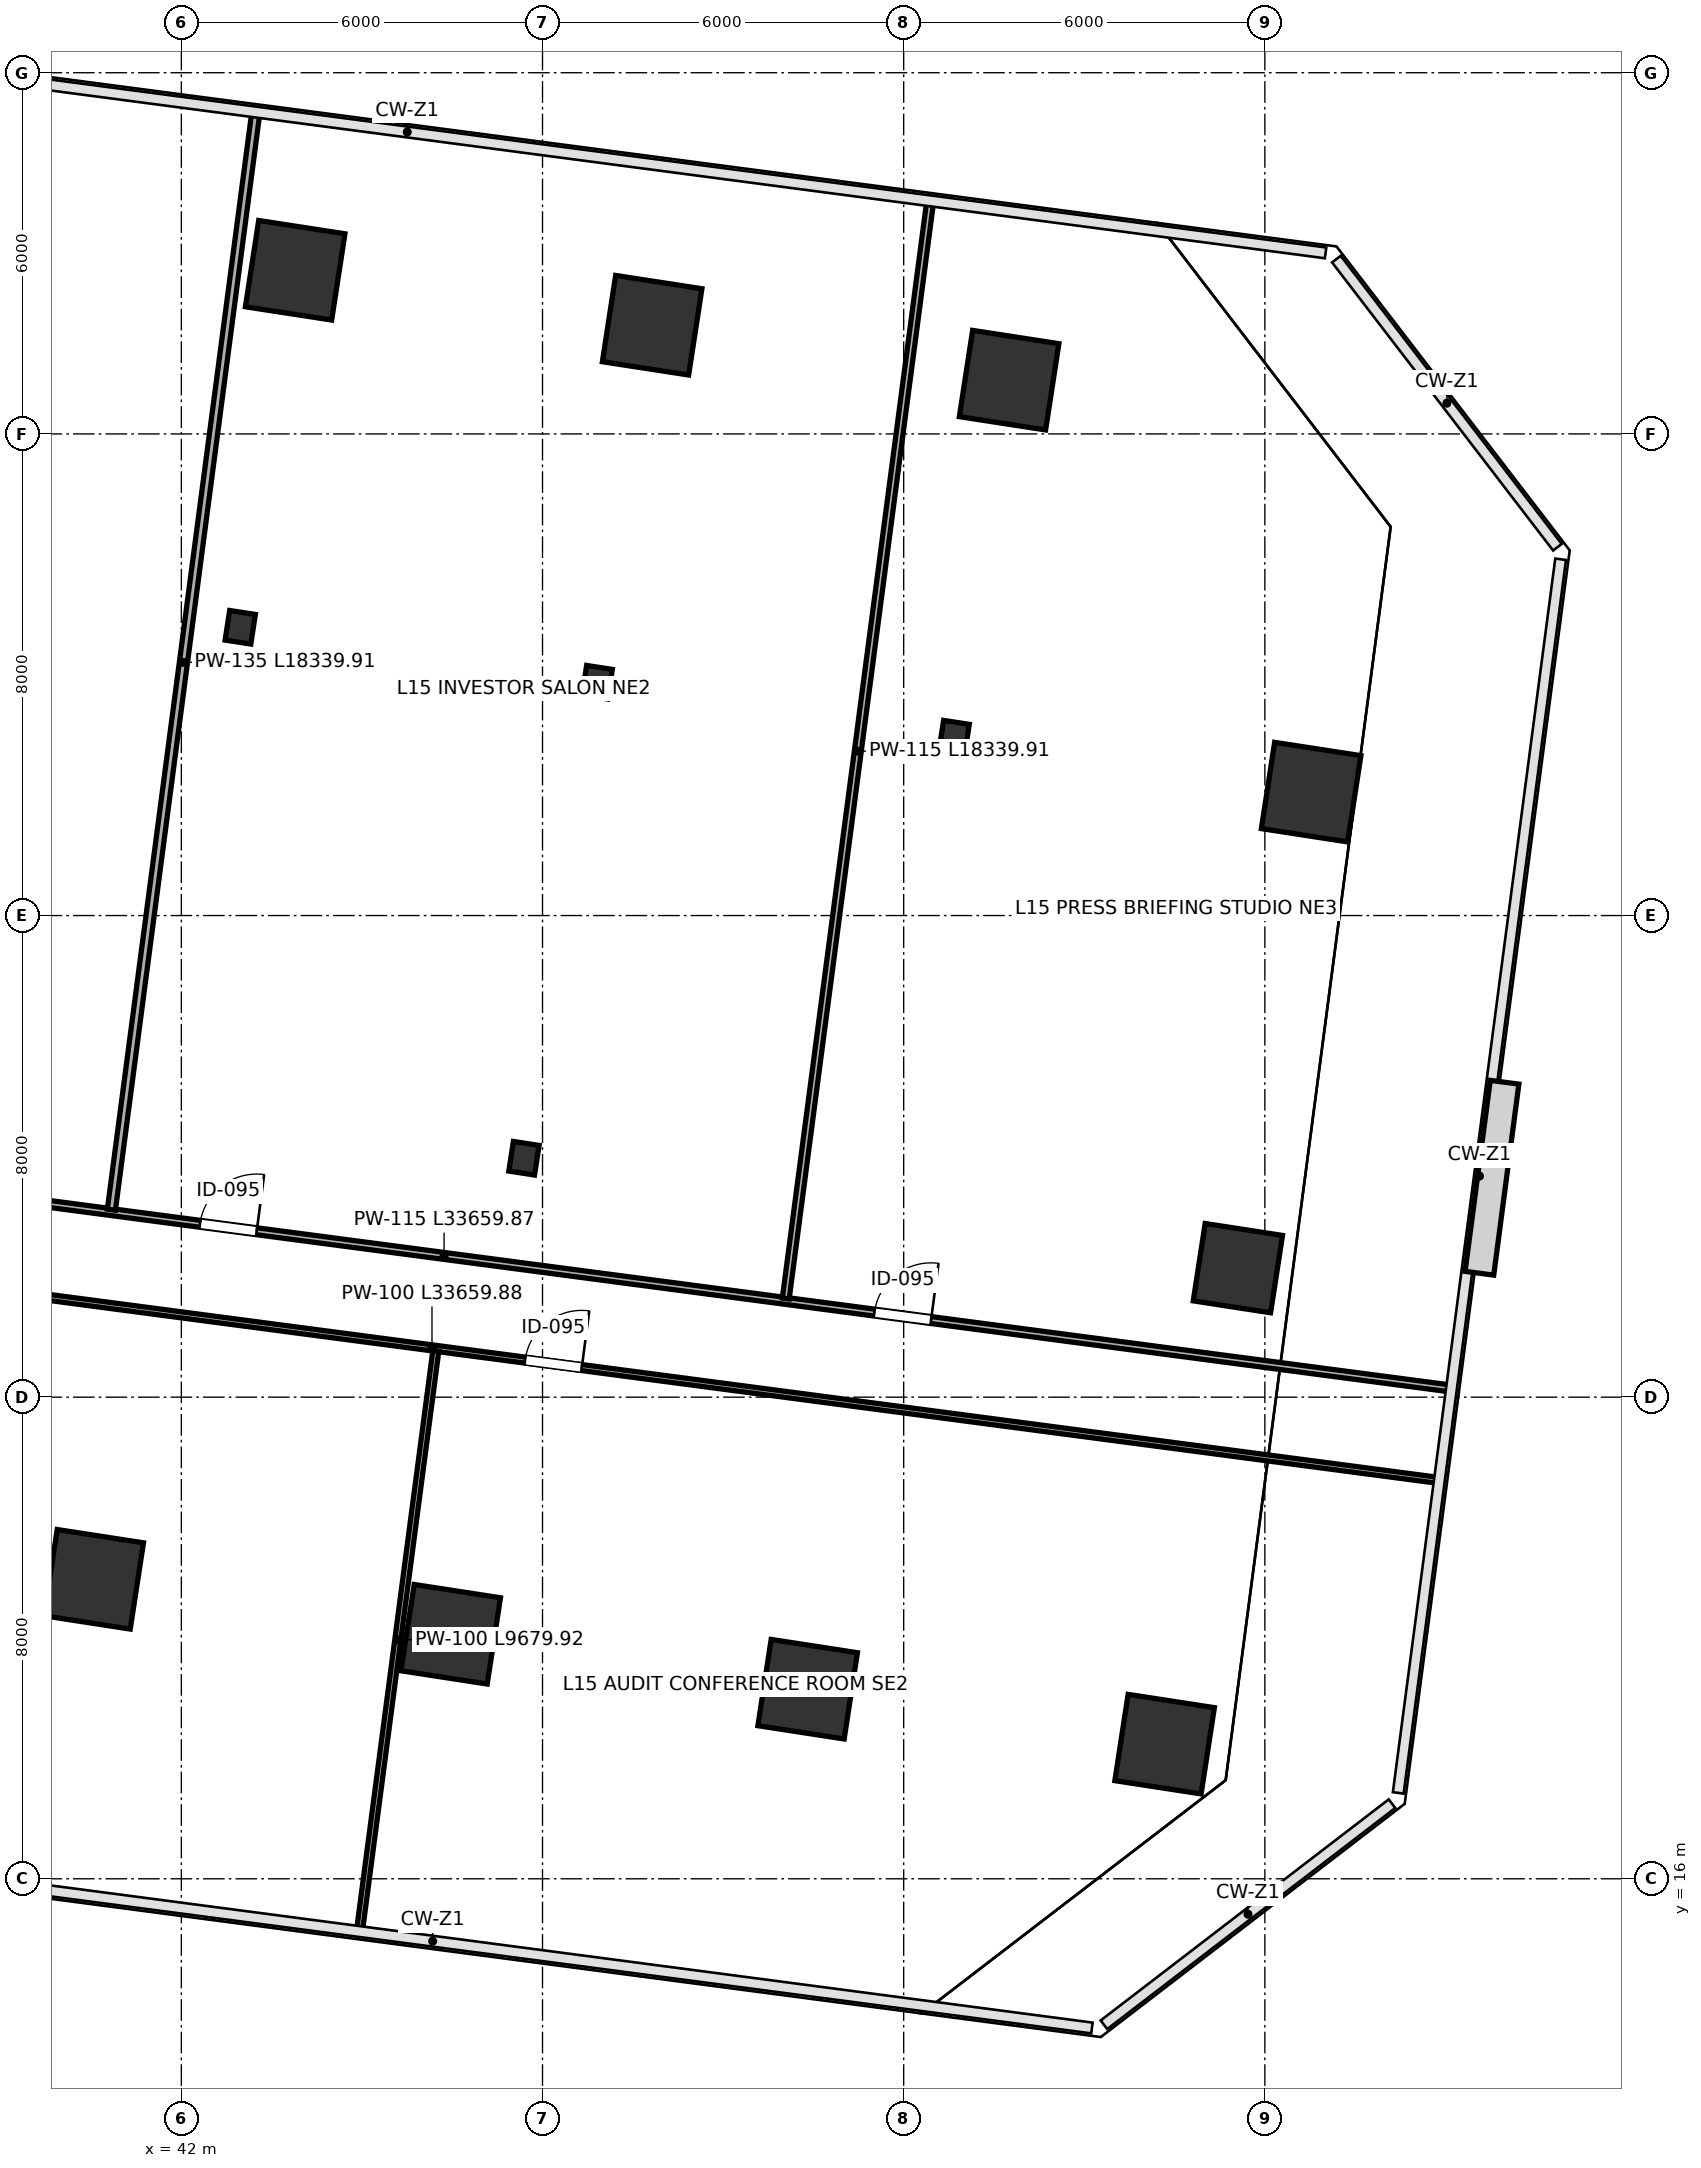
"""IFC4 building model, lengths in metres.
Left out: names, types, materials, properties, quantities, classifications, styles, units other than length and angle.
Written with IfcOpenShell. Run it as: python <this file> out.ifc"""

import sys

from ifc_helpers import new_model, si_unit, direction, frame, frame_2d, origin, origin_2d, place, context, subcontext, project, spatial, rectangle, i_section, extrude, clip, halfspace, source, transform, mapped, element, fill, save


model = new_model("IFC4")
c1 = context("Model", 3, precision=1e-05, world=origin(), true_north=direction((0.0, 1.0)))
c2 = subcontext(c1, "Body", "Model", "MODEL_VIEW")
j1 = project(units=[si_unit("LENGTHUNIT", "METRE"), si_unit("PLANEANGLEUNIT", "RADIAN")], contexts=[c1])
p1 = place(None, origin())
s1 = spatial("IfcSite", under=j1, at=p1, CompositionType="ELEMENT")
p2 = place(p1, origin())
s2 = spatial("IfcBuilding", under=s1, at=p2, CompositionType="ELEMENT")
p3 = place(p2, frame((0.0, 0.0, 70.6)))
s3 = spatial("IfcBuildingStorey", under=s2, at=p3, CompositionType="ELEMENT", Elevation=70.6)
p4 = place(p3, frame((40.544, 20.975, 0.0), z_axis=(-0.057984263369, -0.097660746371, 0.993529166064), x_axis=(-0.772693676035, 0.634543900817, 0.017277758853)))
e1 = element("IfcColumn", 1, at=p4, inside=s3, PredefinedType="COLUMN", context=c2, shape_type="Clipping", body=[
    clip(clip(extrude(rectangle(XDim=1.45, YDim=1.45, at=origin_2d()), origin(), (0.0, 0.0, 1.0), 4.227), halfspace(frame((0.0, 0.0, 0.095), z_axis=(0.0, 0.0, -1.0), x_axis=(1.0, 0.0, 0.0)), False)), halfspace(frame((0.0, 0.0, 4.132), z_axis=(0.0, 0.0, 1.0), x_axis=(1.0, 0.0, 0.0)), False)),
])
p5 = place(p3, frame((42.979, 36.788, 0.0), z_axis=(0.023447854256, -0.111117417708, 0.993530632448), x_axis=(-0.998270833842, -0.05618619741, 0.017275807401)))
e2 = element("IfcColumn", 2, at=p5, inside=s3, PredefinedType="COLUMN", context=c2, shape_type="Clipping", body=[
    clip(clip(extrude(i_section(OverallWidth=0.432, OverallDepth=0.498, WebThickness=0.056, FlangeThickness=0.089, FilletRadius=0.015, at=origin_2d()), origin(), (0.0, 0.0, 1.0), 4.227), halfspace(frame((0.0, 0.0, 0.033), z_axis=(0.0, 0.0, -1.0), x_axis=(1.0, 0.0, 0.0)), False)), halfspace(frame((0.0, 0.0, 4.195), z_axis=(0.0, 0.0, 1.0), x_axis=(1.0, 0.0, 0.0)), False)),
])
p6 = place(p3, frame((43.891, 42.719, 0.0), z_axis=(0.053962386777, -0.115938418599, 0.991789465515), x_axis=(-0.9597220403, -0.280276928816, 0.019453753756)))
e3 = element("IfcColumn", 3, at=p6, inside=s3, PredefinedType="COLUMN", context=c2, shape_type="Clipping", body=[
    clip(clip(extrude(rectangle(XDim=1.45, YDim=1.45, at=origin_2d()), origin(), (0.0, 0.0, 1.0), 4.235), halfspace(frame((0.0, 0.0, 0.107), z_axis=(0.0, 0.0, -1.0), x_axis=(1.0, 0.0, 0.0)), False)), halfspace(frame((0.0, 0.0, 4.127), z_axis=(0.0, 0.0, 1.0), x_axis=(1.0, 0.0, 0.0)), False)),
])
p7 = place(p3, frame((46.475, 20.062, 0.0), z_axis=(-0.06277402471, -0.127676957682, 0.98982726589), x_axis=(-0.820518646619, 0.571209874027, 0.021643252166)))
e4 = element("IfcColumn", 4, at=p7, inside=s3, PredefinedType="COLUMN", context=c2, shape_type="Clipping", body=[
    clip(clip(extrude(rectangle(XDim=1.45, YDim=1.45, at=origin_2d()), origin(), (0.0, 0.0, 1.0), 4.243), halfspace(frame((0.0, 0.0, 0.12), z_axis=(0.0, 0.0, -1.0), x_axis=(1.0, 0.0, 0.0)), False)), halfspace(frame((0.0, 0.0, 4.124), z_axis=(0.0, 0.0, 1.0), x_axis=(1.0, 0.0, 0.0)), False)),
])
p8 = place(p3, frame((47.692, 27.969, 0.0), z_axis=(-0.022228231983, -0.134578699856, 0.990653561669), x_axis=(-0.950591081716, 0.309751570207, 0.02074994257)))
e5 = element("IfcColumn", 5, at=p8, inside=s3, PredefinedType="COLUMN", context=c2, shape_type="Clipping", body=[
    clip(clip(extrude(i_section(OverallWidth=0.432, OverallDepth=0.498, WebThickness=0.056, FlangeThickness=0.089, FilletRadius=0.015, at=origin_2d()), origin(), (0.0, 0.0, 1.0), 4.24), halfspace(frame((0.0, 0.0, 0.039), z_axis=(0.0, 0.0, -1.0), x_axis=(1.0, 0.0, 0.0)), False)), halfspace(frame((0.0, 0.0, 4.2), z_axis=(0.0, 0.0, 1.0), x_axis=(1.0, 0.0, 0.0)), False)),
])
p9 = place(p3, frame((48.909, 35.875, 0.0), z_axis=(0.018354646883, -0.141083367265, 0.9898275559), x_axis=(-0.99952787688, 0.021808398895, 0.021642945231)))
e6 = element("IfcColumn", 6, at=p9, inside=s3, PredefinedType="COLUMN", context=c2, shape_type="Clipping", body=[
    clip(clip(extrude(i_section(OverallWidth=0.432, OverallDepth=0.498, WebThickness=0.056, FlangeThickness=0.089, FilletRadius=0.015, at=origin_2d()), origin(), (0.0, 0.0, 1.0), 4.243), halfspace(frame((0.0, 0.0, 0.041), z_axis=(0.0, 0.0, -1.0), x_axis=(1.0, 0.0, 0.0)), False)), halfspace(frame((0.0, 0.0, 4.202), z_axis=(0.0, 0.0, 1.0), x_axis=(1.0, 0.0, 0.0)), False)),
])
p10 = place(p3, frame((49.821, 41.806, 0.0), z_axis=(0.048764064731, -0.145947571829, 0.988089759216), x_axis=(-0.985054138532, -0.170646958997, 0.023408535767)))
e7 = element("IfcColumn", 7, at=p10, inside=s3, PredefinedType="COLUMN", context=c2, shape_type="Clipping", body=[
    clip(clip(extrude(rectangle(XDim=1.45, YDim=1.45, at=origin_2d()), origin(), (0.0, 0.0, 1.0), 4.25), halfspace(frame((0.0, 0.0, 0.129), z_axis=(0.0, 0.0, -1.0), x_axis=(1.0, 0.0, 0.0)), False)), halfspace(frame((0.0, 0.0, 4.121), z_axis=(0.0, 0.0, 1.0), x_axis=(1.0, 0.0, 0.0)), False)),
])
p11 = place(p3, frame((52.405, 19.149, 0.0), z_axis=(-0.067464483567, -0.157436218442, 0.985221995583), x_axis=(-0.849431935336, 0.527054522787, 0.026056040418)))
e8 = element("IfcColumn", 8, at=p11, inside=s3, PredefinedType="COLUMN", context=c2, shape_type="Clipping", body=[
    clip(clip(extrude(rectangle(XDim=1.45, YDim=1.45, at=origin_2d()), origin(), (0.0, 0.0, 1.0), 4.263), halfspace(frame((0.0, 0.0, 0.145), z_axis=(0.0, 0.0, -1.0), x_axis=(1.0, 0.0, 0.0)), False)), halfspace(frame((0.0, 0.0, 4.118), z_axis=(0.0, 0.0, 1.0), x_axis=(1.0, 0.0, 0.0)), False)),
])
p12 = place(p3, frame((54.839, 34.963, 0.0), z_axis=(0.013343951587, -0.170779672247, 0.985218880505), x_axis=(-0.997033163433, 0.072427976138, 0.026058766025)))
e9 = element("IfcColumn", 9, at=p12, inside=s3, PredefinedType="COLUMN", context=c2, shape_type="Clipping", body=[
    clip(clip(extrude(i_section(OverallWidth=0.432, OverallDepth=0.498, WebThickness=0.056, FlangeThickness=0.089, FilletRadius=0.015, at=origin_2d()), origin(), (0.0, 0.0, 1.0), 4.263), halfspace(frame((0.0, 0.0, 0.049), z_axis=(0.0, 0.0, -1.0), x_axis=(1.0, 0.0, 0.0)), False)), halfspace(frame((0.0, 0.0, 4.214), z_axis=(0.0, 0.0, 1.0), x_axis=(1.0, 0.0, 0.0)), False)),
])
p13 = place(p3, frame((55.751, 40.893, 0.0), z_axis=(0.04350766253, -0.17545994258, 0.983524728642), x_axis=(-0.995318492327, -0.092654489615, 0.027499897927)))
e10 = element("IfcColumn", 10, at=p13, inside=s3, PredefinedType="COLUMN", context=c2, shape_type="Clipping", body=[
    clip(clip(extrude(rectangle(XDim=1.45, YDim=1.45, at=origin_2d()), origin(), (0.0, 0.0, 1.0), 4.27), halfspace(frame((0.0, 0.0, 0.153), z_axis=(0.0, 0.0, -1.0), x_axis=(1.0, 0.0, 0.0)), False)), halfspace(frame((0.0, 0.0, 4.117), z_axis=(0.0, 0.0, 1.0), x_axis=(1.0, 0.0, 0.0)), False)),
])
p14 = place(p3, frame((58.335, 18.236, 0.0), z_axis=(-0.072102962182, -0.186693135887, 0.979768766525), x_axis=(-0.868291518167, 0.495119125256, 0.030444889298)))
e11 = element("IfcColumn", 11, at=p14, inside=s3, PredefinedType="COLUMN", context=c2, shape_type="Clipping", body=[
    clip(clip(extrude(rectangle(XDim=1.45, YDim=1.45, at=origin_2d()), origin(), (0.0, 0.0, 1.0), 4.287), halfspace(frame((0.0, 0.0, 0.17), z_axis=(0.0, 0.0, -1.0), x_axis=(1.0, 0.0, 0.0)), False)), halfspace(frame((0.0, 0.0, 4.117), z_axis=(0.0, 0.0, 1.0), x_axis=(1.0, 0.0, 0.0)), False)),
])
p15 = place(p3, frame((59.552, 26.143, 0.0), z_axis=(-0.03197715877, -0.193515960829, 0.980575868672), x_axis=(-0.950818708279, 0.308307488046, 0.029837506631)))
e12 = element("IfcColumn", 12, at=p15, inside=s3, PredefinedType="COLUMN", context=c2, shape_type="Clipping", body=[
    clip(clip(extrude(rectangle(XDim=1.3, YDim=1.3, at=origin_2d()), origin(), (0.0, 0.0, 1.0), 4.283), halfspace(frame((0.0, 0.0, 0.149), z_axis=(0.0, 0.0, -1.0), x_axis=(1.0, 0.0, 0.0)), False)), halfspace(frame((0.0, 0.0, 4.134), z_axis=(0.0, 0.0, 1.0), x_axis=(1.0, 0.0, 0.0)), False)),
])
p16 = place(p3, frame((60.769, 34.05, 0.0), z_axis=(0.008258330783, -0.199908558947, 0.97977975486), x_axis=(-0.993671221065, 0.108125443028, 0.030436704766)))
e13 = element("IfcColumn", 13, at=p16, inside=s3, PredefinedType="COLUMN", context=c2, shape_type="Clipping", body=[
    clip(clip(extrude(rectangle(XDim=1.45, YDim=1.45, at=origin_2d()), origin(), (0.0, 0.0, 1.0), 4.287), halfspace(frame((0.0, 0.0, 0.17), z_axis=(0.0, 0.0, -1.0), x_axis=(1.0, 0.0, 0.0)), False)), halfspace(frame((0.0, 0.0, 4.117), z_axis=(0.0, 0.0, 1.0), x_axis=(1.0, 0.0, 0.0)), False)),
])
p17 = place(p3, frame((29.679, 28.543, 0.0), z_axis=(0.0, 0.0, 1.0), x_axis=(0.991444714197, -0.130527310133, 0.0)))
e14 = element("IfcWall", 14, at=p17, inside=s3, PredefinedType="PARTITIONING", context=c2, shape_type="SweptSolid", body=[
    extrude(rectangle(XDim=33.66, YDim=0.115, at=frame_2d((16.83, 0.0))), origin(), (0.0, 0.0, 1.0), 3.095),
])
p18 = place(p17, frame((1.05, 0.0, 0.0)))
e15 = element("IfcOpeningElement", 15, at=p18, cuts=e14, PredefinedType="OPENING", context=c2, shape_type="SweptSolid", body=[
    extrude(rectangle(XDim=0.95, YDim=2.15, at=frame_2d((0.475, 1.075))), frame((0.0, 0.067, 0.0), z_axis=(0.0, -1.0, 0.0), x_axis=(1.0, 0.0, 0.0)), (0.0, 0.0, 1.0), 0.135),
])
p19 = place(p17, frame((12.74, 0.0, 0.0)))
e16 = element("IfcOpeningElement", 16, at=p19, cuts=e14, PredefinedType="OPENING", context=c2, shape_type="SweptSolid", body=[
    extrude(rectangle(XDim=0.95, YDim=2.15, at=frame_2d((0.475, 1.075))), frame((0.0, 0.067, 0.0), z_axis=(0.0, -1.0, 0.0), x_axis=(1.0, 0.0, 0.0)), (0.0, 0.0, 1.0), 0.135),
])
p20 = place(p17, frame((24.04, 0.0, 0.0)))
e17 = element("IfcOpeningElement", 17, at=p20, cuts=e14, PredefinedType="OPENING", context=c2, shape_type="SweptSolid", body=[
    extrude(rectangle(XDim=0.95, YDim=2.15, at=frame_2d((0.475, 1.075))), frame((0.0, 0.067, 0.0), z_axis=(0.0, -1.0, 0.0), x_axis=(1.0, 0.0, 0.0)), (0.0, 0.0, 1.0), 0.135),
])
p21 = place(p3, frame((29.478, 27.016, 0.0), z_axis=(0.0, 0.0, 1.0), x_axis=(0.991444590622, -0.130528248771, 0.0)))
e18 = element("IfcWall", 18, at=p21, inside=s3, PredefinedType="PARTITIONING", context=c2, shape_type="SweptSolid", body=[
    extrude(rectangle(XDim=33.66, YDim=0.1, at=frame_2d((16.83, 0.0))), origin(), (0.0, 0.0, 1.0), 3.095),
])
p22 = place(p21, frame((1.05, 0.0, 0.0)))
e19 = element("IfcOpeningElement", 19, at=p22, cuts=e18, PredefinedType="OPENING", context=c2, shape_type="SweptSolid", body=[
    extrude(rectangle(XDim=0.95, YDim=2.15, at=frame_2d((0.475, 1.075))), frame((0.0, 0.06, 0.0), z_axis=(0.0, -1.0, 0.0), x_axis=(1.0, 0.0, 0.0)), (0.0, 0.0, 1.0), 0.12),
])
p23 = place(p21, frame((18.39, 0.0, 0.0)))
e20 = element("IfcOpeningElement", 20, at=p23, cuts=e18, PredefinedType="OPENING", context=c2, shape_type="SweptSolid", body=[
    extrude(rectangle(XDim=0.95, YDim=2.15, at=frame_2d((0.475, 1.075))), frame((0.0, 0.06, 0.0), z_axis=(0.0, -1.0, 0.0), x_axis=(1.0, 0.0, 0.0)), (0.0, 0.0, 1.0), 0.12),
])
p24 = place(p3, frame((40.838, 27.114, 0.0), z_axis=(0.0, 0.0, 1.0), x_axis=(0.130538190585, 0.991443281685, 0.0)))
e21 = element("IfcWall", 21, at=p24, inside=s3, PredefinedType="PARTITIONING", context=c2, shape_type="SweptSolid", body=[
    extrude(rectangle(XDim=18.34, YDim=0.135, at=frame_2d((9.17, 0.0))), origin(), (0.0, 0.0, 1.0), 3.96),
])
p25 = place(p3, frame((52.041, 25.639, 0.0), z_axis=(0.0, 0.0, 1.0), x_axis=(0.130523382643, 0.991445231258, 0.0)))
e22 = element("IfcWall", 22, at=p25, inside=s3, PredefinedType="PARTITIONING", context=c2, shape_type="SweptSolid", body=[
    extrude(rectangle(XDim=18.34, YDim=0.115, at=frame_2d((9.17, 0.0))), origin(), (0.0, 0.0, 1.0), 3.323),
])
p26 = place(p3, frame((44.964, 15.173, 0.0), z_axis=(0.0, 0.0, 1.0), x_axis=(0.130519754353, 0.991445708914, 0.0)))
e23 = element("IfcWall", 23, at=p26, inside=s3, PredefinedType="PARTITIONING", context=c2, shape_type="SweptSolid", body=[
    extrude(rectangle(XDim=9.68, YDim=0.1, at=frame_2d((4.84, 0.0))), origin(), (0.0, 0.0, 1.0), 3.96),
])
m1 = source(origin(), c2, "Body", "SweptSolid", [
    extrude(rectangle(XDim=0.95, YDim=2.15, at=frame_2d((0.475, 1.075))), frame((0.0, 0.025, 0.0), z_axis=(0.0, -1.0, 0.0), x_axis=(1.0, 0.0, 0.0)), (0.0, 0.0, 1.0), 0.05),
])
p27 = place(p19, origin())
e24 = element("IfcDoor", 24, at=p27, inside=s3, OperationType="SINGLE_SWING_RIGHT", PredefinedType="DOOR", context=c2, shape_type="MappedRepresentation", body=[
    mapped(m1, transform((0.0, 0.0, 0.0), scale=1.0)),
])
fill(e16, e24)
p28 = place(p20, origin())
e25 = element("IfcDoor", 25, at=p28, inside=s3, OperationType="SINGLE_SWING_RIGHT", PredefinedType="DOOR", context=c2, shape_type="MappedRepresentation", body=[
    mapped(m1, transform((0.0, 0.0, 0.0), scale=1.0)),
])
fill(e17, e25)
p29 = place(p23, origin())
e26 = element("IfcDoor", 26, at=p29, inside=s3, OperationType="SINGLE_SWING_RIGHT", PredefinedType="DOOR", context=c2, shape_type="MappedRepresentation", body=[
    mapped(m1, transform((0.0, 0.0, 0.0), scale=1.0)),
])
fill(e20, e26)
save(model, sys.argv[1])
